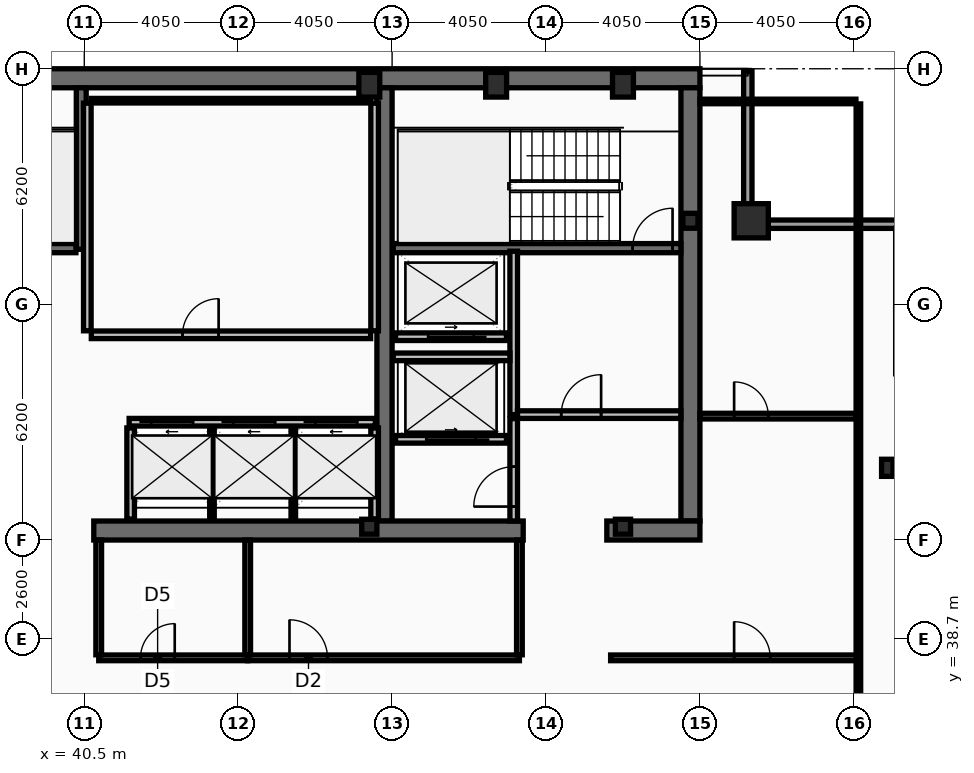
"""IFC4 building model, lengths in metres.
Left out: names, types, materials, properties, quantities, classifications, styles, units other than length and angle.
Written with IfcOpenShell. Run it as: python <this file> out.ifc"""

import sys

from ifc_helpers import new_model, si_unit, direction, frame, frame_2d, origin, origin_2d, place, context, subcontext, project, spatial, rectangle, hollow_rectangle, i_section, extrude, element, fill, save


model = new_model("IFC4")
c1 = context("Model", 3, precision=1e-05, world=origin(), true_north=direction((0.0, 1.0)))
c2 = subcontext(c1, "Body", "Model", "MODEL_VIEW")
j1 = project(units=[si_unit("LENGTHUNIT", "METRE"), si_unit("PLANEANGLEUNIT", "RADIAN")], contexts=[c1])
p1 = place(None, origin())
s1 = spatial("IfcSite", under=j1, at=p1, CompositionType="ELEMENT")
p2 = place(p1, origin())
s2 = spatial("IfcBuilding", under=s1, at=p2, CompositionType="ELEMENT")
p3 = place(p2, frame((0.0, 0.0, 336.2)))
s3 = spatial("IfcBuildingStorey", under=s2, at=p3, CompositionType="ELEMENT", Elevation=336.2)
p4 = place(p3, frame((16.2, 53.45, 0.0), z_axis=(0.0, 0.0, 1.0), x_axis=(1.0, 0.0, 0.0)))
e1 = element("IfcWall", 1, at=p4, inside=s3, PredefinedType="SHEAR", context=c2, shape_type="SweptSolid", body=[
    extrude(rectangle(XDim=40.5, YDim=0.5, at=frame_2d((20.25, 0.0))), origin(), (0.0, 0.0, 1.0), 3.44),
])
p5 = place(p3, frame((56.45, 53.2, 0.0), z_axis=(0.0, 0.0, 1.0), x_axis=(0.0, -1.0, 0.0)))
e2 = element("IfcWall", 2, at=p5, inside=s3, PredefinedType="SHEAR", context=c2, shape_type="SweptSolid", body=[
    extrude(rectangle(XDim=11.4, YDim=0.5, at=frame_2d((5.7, 0.0))), origin(), (0.0, 0.0, 1.0), 3.44),
])
p6 = place(p3, frame((48.4, 41.8, 0.0), z_axis=(0.0, 0.0, 1.0), x_axis=(0.0, 1.0, 0.0)))
e3 = element("IfcWall", 3, at=p6, inside=s3, PredefinedType="SHEAR", context=c2, shape_type="SweptSolid", body=[
    extrude(rectangle(XDim=11.4, YDim=0.4, at=frame_2d((5.7, 0.0))), origin(), (0.0, 0.0, 1.0), 3.44),
])
p7 = place(p3, frame((52.05, 41.55, 0.0), z_axis=(0.0, 0.0, 1.0), x_axis=(-1.0, 0.0, 0.0)))
e4 = element("IfcWall", 4, at=p7, inside=s3, PredefinedType="SHEAR", context=c2, shape_type="SweptSolid", body=[
    extrude(rectangle(XDim=11.3, YDim=0.5, at=frame_2d((5.65, 0.0))), origin(), (0.0, 0.0, 1.0), 3.44),
])
p8 = place(p3, frame((56.7, 41.55, 0.0), z_axis=(0.0, 0.0, 1.0), x_axis=(-1.0, 0.0, 0.0)))
e5 = element("IfcWall", 5, at=p8, inside=s3, PredefinedType="SHEAR", context=c2, shape_type="SweptSolid", body=[
    extrude(rectangle(XDim=2.45, YDim=0.5, at=frame_2d((1.225, 0.0))), origin(), (0.0, 0.0, 1.0), 3.44),
])
p9 = place(p3, frame((40.42, 48.95, 0.0), z_axis=(0.0, 0.0, 1.0), x_axis=(0.0, 1.0, 0.0)))
e6 = element("IfcWall", 6, at=p9, inside=s3, PredefinedType="SHEAR", context=c2, shape_type="SweptSolid", body=[
    extrude(rectangle(XDim=4.25, YDim=0.26, at=frame_2d((2.125, 0.0))), origin(), (0.0, 0.0, 1.0), 3.44),
])
p10 = place(p3, frame((48.63, 48.98, 0.0), z_axis=(0.0, 0.0, 1.0), x_axis=(1.0, 0.0, 0.0)))
e7 = element("IfcWall", 7, at=p10, inside=s3, PredefinedType="SHEAR", context=c2, shape_type="SweptSolid", body=[
    extrude(rectangle(XDim=7.57, YDim=0.24, at=frame_2d((3.785, 0.0))), origin(), (0.0, 0.0, 1.0), 3.44),
])
p11 = place(p10, frame((6.3, 0.0, 0.0)))
e8 = element("IfcOpeningElement", 8, at=p11, cuts=e7, PredefinedType="OPENING", context=c2, shape_type="SweptSolid", body=[
    extrude(rectangle(XDim=1.05, YDim=2.15, at=frame_2d((0.525, 1.075))), frame((0.0, 0.13, 0.0), z_axis=(0.0, -1.0, 0.0), x_axis=(1.0, 0.0, 0.0)), (0.0, 0.0, 1.0), 0.26),
])
p12 = place(p3, frame((32.72, 48.98, 0.0), z_axis=(0.0, 0.0, 1.0), x_axis=(1.0, 0.0, 0.0)))
e9 = element("IfcWall", 9, at=p12, inside=s3, PredefinedType="SHEAR", context=c2, shape_type="SweptSolid", body=[
    extrude(rectangle(XDim=7.56, YDim=0.24, at=frame_2d((3.78, 0.0))), origin(), (0.0, 0.0, 1.0), 3.44),
])
p13 = place(p12, frame((0.22, 0.0, 0.0)))
e10 = element("IfcOpeningElement", 10, at=p13, cuts=e9, PredefinedType="OPENING", context=c2, shape_type="SweptSolid", body=[
    extrude(rectangle(XDim=1.05, YDim=2.15, at=frame_2d((0.525, 1.075))), frame((0.0, 0.13, 0.0), z_axis=(0.0, -1.0, 0.0), x_axis=(1.0, 0.0, 0.0)), (0.0, 0.0, 1.0), 0.26),
])
p14 = place(p3, frame((58.05, 49.7, 0.0), z_axis=(0.0, 0.0, 1.0), x_axis=(1.0, 0.0, 0.0)))
e11 = element("IfcColumn", 11, at=p14, inside=s3, PredefinedType="COLUMN", context=c2, shape_type="SweptSolid", body=[
    extrude(hollow_rectangle(XDim=0.9, YDim=0.9, WallThickness=0.05, at=origin_2d()), origin(), (0.0, 0.0, 1.0), 3.6),
])
for number, where, z_axis, x_axis in (
    (12, (48.0, 53.28, 0.0), (0.0, 0.0, 1.0), (1.0, 0.0, 0.0)),
    (13, (51.337, 53.28, 0.0), (0.0, 0.0, 1.0), (1.0, 0.0, 0.0)),
    (14, (54.675, 53.28, 0.0), (0.0, 0.0, 1.0), (1.0, 0.0, 0.0)),
):
    element("IfcColumn", number, at=place(p3, frame(where, z_axis=z_axis, x_axis=x_axis)), inside=s3, PredefinedType="COLUMN", context=c2, shape_type="SweptSolid", body=[
        extrude(hollow_rectangle(XDim=0.55, YDim=0.65, WallThickness=0.04, at=origin_2d()), origin(), (0.0, 0.0, 1.0), 3.6),
    ])
p15 = place(p3, frame((61.63, 43.2, 0.0), z_axis=(0.0, 0.0, 1.0), x_axis=(1.0, 0.0, 0.0)))
e15 = element("IfcColumn", 15, at=p15, inside=s3, PredefinedType="COLUMN", context=c2, shape_type="SweptSolid", body=[
    extrude(i_section(OverallWidth=0.3, OverallDepth=0.45, WebThickness=0.014, FlangeThickness=0.026, at=origin_2d()), origin(), (0.0, 0.0, 1.0), 3.6),
])
for number, where, z_axis, x_axis in (
    (16, (56.45, 49.7, 0.0), (0.0, 0.0, 1.0), (1.0, 0.0, 0.0)),
    (17, (48.0, 41.65, 0.0), (0.0, 0.0, 1.0), (1.0, 0.0, 0.0)),
    (18, (54.675, 41.65, 0.0), (0.0, 0.0, 1.0), (1.0, 0.0, 0.0)),
):
    element("IfcColumn", number, at=place(p3, frame(where, z_axis=z_axis, x_axis=x_axis)), inside=s3, PredefinedType="COLUMN", context=c2, shape_type="SweptSolid", body=[
        extrude(i_section(OverallWidth=0.399, OverallDepth=0.393, WebThickness=0.023, FlangeThickness=0.037, at=origin_2d()), origin(), (0.0, 0.0, 1.0), 3.6),
    ])
p16 = place(p3, frame((57.96, 53.63, 0.0), z_axis=(0.0, 0.0, 1.0), x_axis=(0.0, -1.0, 0.0)))
e19 = element("IfcWall", 19, at=p16, inside=s3, PredefinedType="SOLIDWALL", context=c2, shape_type="SweptSolid", body=[
    extrude(rectangle(XDim=3.91, YDim=0.22, at=frame_2d((1.955, 0.0))), origin(), (0.0, 0.0, 1.0), 2.88),
])
p17 = place(p3, frame((57.85, 49.61, 0.0), z_axis=(0.0, 0.0, 1.0), x_axis=(1.0, 0.0, 0.0)))
e20 = element("IfcWall", 20, at=p17, inside=s3, PredefinedType="SOLIDWALL", context=c2, shape_type="SweptSolid", body=[
    extrude(rectangle(XDim=4.22, YDim=0.22, at=frame_2d((2.11, 0.0))), origin(), (0.0, 0.0, 1.0), 2.88),
])
p18 = place(p3, frame((41.68, 44.4, 0.0), z_axis=(0.0, 0.0, 1.0), x_axis=(1.0, 0.0, 0.0)))
e21 = element("IfcWall", 21, at=p18, inside=s3, PredefinedType="PARTITIONING", context=c2, shape_type="SweptSolid", body=[
    extrude(rectangle(XDim=6.48, YDim=0.2, at=frame_2d((3.24, 0.0))), origin(), (0.0, 0.0, 1.0), 3.44),
])
p19 = place(p18, frame((0.58, 0.0, 0.0)))
e22 = element("IfcOpeningElement", 22, at=p19, cuts=e21, PredefinedType="OPENING", context=c2, shape_type="SweptSolid", body=[
    extrude(rectangle(XDim=1.1, YDim=2.18, at=frame_2d((0.55, 1.09))), frame((0.0, 0.11, 0.0), z_axis=(0.0, -1.0, 0.0), x_axis=(1.0, 0.0, 0.0)), (0.0, 0.0, 1.0), 0.22),
])
p20 = place(p18, frame((2.74, 0.0, 0.0)))
e23 = element("IfcOpeningElement", 23, at=p20, cuts=e21, PredefinedType="OPENING", context=c2, shape_type="SweptSolid", body=[
    extrude(rectangle(XDim=1.1, YDim=2.18, at=frame_2d((0.55, 1.09))), frame((0.0, 0.11, 0.0), z_axis=(0.0, -1.0, 0.0), x_axis=(1.0, 0.0, 0.0)), (0.0, 0.0, 1.0), 0.22),
])
p21 = place(p18, frame((4.9, 0.0, 0.0)))
e24 = element("IfcOpeningElement", 24, at=p21, cuts=e21, PredefinedType="OPENING", context=c2, shape_type="SweptSolid", body=[
    extrude(rectangle(XDim=1.1, YDim=2.18, at=frame_2d((0.55, 1.09))), frame((0.0, 0.11, 0.0), z_axis=(0.0, -1.0, 0.0), x_axis=(1.0, 0.0, 0.0)), (0.0, 0.0, 1.0), 0.22),
])
p22 = place(p3, frame((51.61, 43.95, 0.0), z_axis=(0.0, 0.0, 1.0), x_axis=(-1.0, 0.0, 0.0)))
e25 = element("IfcWall", 25, at=p22, inside=s3, PredefinedType="PARTITIONING", context=c2, shape_type="SweptSolid", body=[
    extrude(rectangle(XDim=2.92, YDim=0.2, at=frame_2d((1.46, 0.0))), origin(), (0.0, 0.0, 1.0), 3.44),
])
p23 = place(p22, frame((0.81, 0.0, 0.0)))
e26 = element("IfcOpeningElement", 26, at=p23, cuts=e25, PredefinedType="OPENING", context=c2, shape_type="SweptSolid", body=[
    extrude(rectangle(XDim=1.3, YDim=2.18, at=frame_2d((0.65, 1.09))), frame((0.0, 0.11, 0.0), z_axis=(0.0, -1.0, 0.0), x_axis=(1.0, 0.0, 0.0)), (0.0, 0.0, 1.0), 0.22),
])
p24 = place(p3, frame((51.61, 46.65, 0.0), z_axis=(0.0, 0.0, 1.0), x_axis=(-1.0, 0.0, 0.0)))
e27 = element("IfcWall", 27, at=p24, inside=s3, PredefinedType="PARTITIONING", context=c2, shape_type="SweptSolid", body=[
    extrude(rectangle(XDim=2.92, YDim=0.2, at=frame_2d((1.46, 0.0))), origin(), (0.0, 0.0, 1.0), 3.44),
])
p25 = place(p24, frame((0.86, 0.0, 0.0)))
e28 = element("IfcOpeningElement", 28, at=p25, cuts=e27, PredefinedType="OPENING", context=c2, shape_type="SweptSolid", body=[
    extrude(rectangle(XDim=1.2, YDim=2.18, at=frame_2d((0.6, 1.09))), frame((0.0, 0.11, 0.0), z_axis=(0.0, -1.0, 0.0), x_axis=(1.0, 0.0, 0.0)), (0.0, 0.0, 1.0), 0.22),
])
p26 = place(p3, frame((51.8, 44.6, 0.0), z_axis=(0.0, 0.0, 1.0), x_axis=(0.0, 1.0, 0.0)))
e29 = element("IfcWall", 29, at=p26, inside=s3, PredefinedType="PARTITIONING", context=c2, shape_type="SweptSolid", body=[
    extrude(rectangle(XDim=4.3, YDim=0.2, at=frame_2d((2.15, 0.0))), origin(), (0.0, 0.0, 1.0), 3.44),
])
p27 = place(p3, frame((51.9, 44.6, 0.0), z_axis=(0.0, 0.0, 1.0), x_axis=(1.0, 0.0, 0.0)))
e30 = element("IfcWall", 30, at=p27, inside=s3, PredefinedType="PARTITIONING", context=c2, shape_type="SweptSolid", body=[
    extrude(rectangle(XDim=4.3, YDim=0.2, at=frame_2d((2.15, 0.0))), origin(), (0.0, 0.0, 1.0), 3.44),
])
p28 = place(p27, frame((1.15, 0.0, 0.0)))
e31 = element("IfcOpeningElement", 31, at=p28, cuts=e30, PredefinedType="OPENING", context=c2, shape_type="SweptSolid", body=[
    extrude(rectangle(XDim=1.05, YDim=2.15, at=frame_2d((0.525, 1.075))), frame((0.0, 0.11, 0.0), z_axis=(0.0, -1.0, 0.0), x_axis=(1.0, 0.0, 0.0)), (0.0, 0.0, 1.0), 0.22),
])
p29 = place(p3, frame((48.63, 46.12, 0.0), z_axis=(0.0, 0.0, 1.0), x_axis=(1.0, 0.0, 0.0)))
e32 = element("IfcWall", 32, at=p29, inside=s3, PredefinedType="PARTITIONING", context=c2, shape_type="SweptSolid", body=[
    extrude(rectangle(XDim=3.07, YDim=0.2, at=frame_2d((1.535, 0.0))), origin(), (0.0, 0.0, 1.0), 3.44),
])
p30 = place(p3, frame((51.8, 41.8, 0.0), z_axis=(0.0, 0.0, 1.0), x_axis=(0.0, 1.0, 0.0)))
e33 = element("IfcWall", 33, at=p30, inside=s3, PredefinedType="PARTITIONING", context=c2, shape_type="SweptSolid", body=[
    extrude(rectangle(XDim=2.695, YDim=0.2, at=frame_2d((1.348, 0.0))), origin(), (0.0, 0.0, 1.0), 3.44),
])
p31 = place(p30, frame((0.38, 0.0, 0.0)))
e34 = element("IfcOpeningElement", 34, at=p31, cuts=e33, PredefinedType="OPENING", context=c2, shape_type="SweptSolid", body=[
    extrude(rectangle(XDim=1.05, YDim=2.15, at=frame_2d((0.525, 1.075))), frame((0.0, 0.11, 0.0), z_axis=(0.0, -1.0, 0.0), x_axis=(1.0, 0.0, 0.0)), (0.0, 0.0, 1.0), 0.22),
])
for number, where, z_axis, x_axis in (
    (35, (40.58, 46.805, 0.0), (0.0, 0.0, 1.0), (0.0, 1.0, 0.0)),
    (36, (48.14, 46.805, 0.0), (0.0, 0.0, 1.0), (0.0, 1.0, 0.0)),
):
    element("IfcWall", number, at=place(p3, frame(where, z_axis=z_axis, x_axis=x_axis)), inside=s3, PredefinedType="PARTITIONING", context=c2, shape_type="SweptSolid", body=[
        extrude(rectangle(XDim=5.99, YDim=0.2, at=frame_2d((2.995, 0.0))), origin(), (0.0, 0.0, 1.0), 3.44),
    ])
p32 = place(p3, frame((40.685, 52.86, 0.0), z_axis=(0.0, 0.0, 1.0), x_axis=(1.0, 0.0, 0.0)))
e37 = element("IfcWall", 37, at=p32, inside=s3, PredefinedType="PARTITIONING", context=c2, shape_type="SweptSolid", body=[
    extrude(rectangle(XDim=7.35, YDim=0.12, at=frame_2d((3.675, 0.0))), origin(), (0.0, 0.0, 1.0), 3.44),
])
p33 = place(p3, frame((40.685, 46.7, 0.0), z_axis=(0.0, 0.0, 1.0), x_axis=(1.0, 0.0, 0.0)))
e38 = element("IfcWall", 38, at=p33, inside=s3, PredefinedType="PARTITIONING", context=c2, shape_type="SweptSolid", body=[
    extrude(rectangle(XDim=7.35, YDim=0.2, at=frame_2d((3.675, 0.0))), origin(), (0.0, 0.0, 1.0), 3.44),
])
p34 = place(p33, frame((2.4, 0.0, 0.0)))
e39 = element("IfcOpeningElement", 39, at=p34, cuts=e38, PredefinedType="OPENING", context=c2, shape_type="SweptSolid", body=[
    extrude(rectangle(XDim=0.95, YDim=2.1, at=frame_2d((0.475, 1.05))), frame((0.0, 0.11, 0.0), z_axis=(0.0, -1.0, 0.0), x_axis=(1.0, 0.0, 0.0)), (0.0, 0.0, 1.0), 0.22),
])
for number, where, z_axis, x_axis in (
    (40, (41.72, 41.85, 0.0), (0.0, 0.0, 1.0), (0.0, 1.0, 0.0)),
    (41, (48.14, 41.85, 0.0), (0.0, 0.0, 1.0), (0.0, 1.0, 0.0)),
):
    element("IfcWall", number, at=place(p3, frame(where, z_axis=z_axis, x_axis=x_axis)), inside=s3, PredefinedType="PARTITIONING", context=c2, shape_type="SweptSolid", body=[
        extrude(rectangle(XDim=2.4, YDim=0.2, at=frame_2d((1.2, 0.0))), origin(), (0.0, 0.0, 1.0), 3.44),
    ])
for number, where, z_axis, x_axis in (
    (42, (43.86, 41.85, 0.0), (0.0, 0.0, 1.0), (0.0, 1.0, 0.0)),
    (43, (46.0, 41.85, 0.0), (0.0, 0.0, 1.0), (0.0, 1.0, 0.0)),
):
    element("IfcWall", number, at=place(p3, frame(where, z_axis=z_axis, x_axis=x_axis)), inside=s3, PredefinedType="PARTITIONING", context=c2, shape_type="SweptSolid", body=[
        extrude(rectangle(XDim=2.4, YDim=0.12, at=frame_2d((1.2, 0.0))), origin(), (0.0, 0.0, 1.0), 3.44),
    ])
p35 = place(p3, frame((40.88, 38.2, 0.0), z_axis=(0.0, 0.0, 1.0), x_axis=(1.0, 0.0, 0.0)))
e44 = element("IfcWall", 44, at=p35, inside=s3, PredefinedType="PARTITIONING", context=c2, shape_type="SweptSolid", body=[
    extrude(rectangle(XDim=3.92, YDim=0.15, at=frame_2d((1.96, 0.0))), origin(), (0.0, 0.0, 1.0), 3.44),
])
p36 = place(p35, frame((1.1, 0.0, 0.0)))
e45 = element("IfcOpeningElement", 45, at=p36, cuts=e44, PredefinedType="OPENING", context=c2, shape_type="SweptSolid", body=[
    extrude(rectangle(XDim=0.9, YDim=2.05, at=frame_2d((0.45, 1.025))), frame((0.0, 0.085, 0.0), z_axis=(0.0, -1.0, 0.0), x_axis=(1.0, 0.0, 0.0)), (0.0, 0.0, 1.0), 0.17),
])
p37 = place(p3, frame((44.8, 38.2, 0.0), z_axis=(0.0, 0.0, 1.0), x_axis=(1.0, 0.0, 0.0)))
e46 = element("IfcWall", 46, at=p37, inside=s3, PredefinedType="PARTITIONING", context=c2, shape_type="SweptSolid", body=[
    extrude(rectangle(XDim=7.15, YDim=0.15, at=frame_2d((3.575, 0.0))), origin(), (0.0, 0.0, 1.0), 2.83),
])
p38 = place(p37, frame((1.1, 0.0, 0.0)))
e47 = element("IfcOpeningElement", 47, at=p38, cuts=e46, PredefinedType="OPENING", context=c2, shape_type="SweptSolid", body=[
    extrude(rectangle(XDim=1.0, YDim=2.05, at=frame_2d((0.5, 1.025))), frame((0.0, 0.085, 0.0), z_axis=(0.0, -1.0, 0.0), x_axis=(1.0, 0.0, 0.0)), (0.0, 0.0, 1.0), 0.17),
])
for number, where, z_axis, x_axis in (
    (48, (40.88, 38.28, 0.0), (0.0, 0.0, 1.0), (0.0, 1.0, 0.0)),
    (49, (44.8, 38.28, 0.0), (0.0, 0.0, 1.0), (0.0, 1.0, 0.0)),
    (50, (51.95, 38.28, 0.0), (0.0, 0.0, 1.0), (0.0, 1.0, 0.0)),
):
    element("IfcWall", number, at=place(p3, frame(where, z_axis=z_axis, x_axis=x_axis)), inside=s3, PredefinedType="PARTITIONING", context=c2, shape_type="SweptSolid", body=[
        extrude(rectangle(XDim=3.02, YDim=0.15, at=frame_2d((1.51, 0.0))), origin(), (0.0, 0.0, 1.0), 3.44),
    ])
p39 = place(p3, frame((54.35, 38.2, 0.0), z_axis=(0.0, 0.0, 1.0), x_axis=(1.0, 0.0, 0.0)))
e51 = element("IfcWall", 51, at=p39, inside=s3, PredefinedType="PARTITIONING", context=c2, shape_type="SweptSolid", body=[
    extrude(rectangle(XDim=6.52, YDim=0.15, at=frame_2d((3.26, 0.0))), origin(), (0.0, 0.0, 1.0), 2.83),
])
p40 = place(p39, frame((3.25, 0.0, 0.0)))
e52 = element("IfcOpeningElement", 52, at=p40, cuts=e51, PredefinedType="OPENING", context=c2, shape_type="SweptSolid", body=[
    extrude(rectangle(XDim=0.95, YDim=2.05, at=frame_2d((0.475, 1.025))), frame((0.0, 0.085, 0.0), z_axis=(0.0, -1.0, 0.0), x_axis=(1.0, 0.0, 0.0)), (0.0, 0.0, 1.0), 0.17),
])
p41 = place(p3, frame((56.7, 44.56, 0.0), z_axis=(0.0, 0.0, 1.0), x_axis=(1.0, 0.0, 0.0)))
e53 = element("IfcWall", 53, at=p41, inside=s3, PredefinedType="PARTITIONING", context=c2, shape_type="SweptSolid", body=[
    extrude(rectangle(XDim=4.105, YDim=0.15, at=frame_2d((2.052, 0.0))), origin(), (0.0, 0.0, 1.0), 2.88),
])
p42 = place(p41, frame((0.9, 0.0, 0.0)))
e54 = element("IfcOpeningElement", 54, at=p42, cuts=e53, PredefinedType="OPENING", context=c2, shape_type="SweptSolid", body=[
    extrude(rectangle(XDim=0.9, YDim=2.05, at=frame_2d((0.45, 1.025))), frame((0.0, 0.085, 0.0), z_axis=(0.0, -1.0, 0.0), x_axis=(1.0, 0.0, 0.0)), (0.0, 0.0, 1.0), 0.17),
])
p43 = place(p3, frame((60.87, 10.665, 0.0), z_axis=(0.0, 0.0, 1.0), x_axis=(0.0, 1.0, 0.0)))
e55 = element("IfcWall", 55, at=p43, inside=s3, PredefinedType="PARTITIONING", context=c2, shape_type="SweptSolid", body=[
    extrude(rectangle(XDim=42.11, YDim=0.12, at=frame_2d((21.055, 0.0))), origin(), (0.0, 0.0, 1.0), 2.83),
])
p44 = place(p3, frame((56.7, 52.84, 0.0), z_axis=(0.0, 0.0, 1.0), x_axis=(1.0, 0.0, 0.0)))
e56 = element("IfcWall", 56, at=p44, inside=s3, PredefinedType="PARTITIONING", context=c2, shape_type="SweptSolid", body=[
    extrude(rectangle(XDim=4.105, YDim=0.12, at=frame_2d((2.052, 0.0))), origin(), (0.0, 0.0, 1.0), 3.44),
])
p45 = place(p11, origin())
e57 = element("IfcDoor", 57, at=p45, inside=s3, OperationType="SINGLE_SWING_RIGHT", PredefinedType="DOOR", context=c2, shape_type="SweptSolid", body=[
    extrude(rectangle(XDim=1.05, YDim=2.15, at=frame_2d((0.525, 1.075))), frame((0.0, 0.025, 0.0), z_axis=(0.0, -1.0, 0.0), x_axis=(1.0, 0.0, 0.0)), (0.0, 0.0, 1.0), 0.05),
])
fill(e8, e57)
p46 = place(p19, origin())
e58 = element("IfcDoor", 58, at=p46, inside=s3, OperationType="SLIDING_TO_LEFT", PredefinedType="DOOR", context=c2, shape_type="SweptSolid", body=[
    extrude(rectangle(XDim=1.1, YDim=2.18, at=frame_2d((0.55, 1.09))), frame((0.0, 0.025, 0.0), z_axis=(0.0, -1.0, 0.0), x_axis=(1.0, 0.0, 0.0)), (0.0, 0.0, 1.0), 0.05),
])
fill(e22, e58)
p47 = place(p20, origin())
e59 = element("IfcDoor", 59, at=p47, inside=s3, OperationType="SLIDING_TO_LEFT", PredefinedType="DOOR", context=c2, shape_type="SweptSolid", body=[
    extrude(rectangle(XDim=1.1, YDim=2.18, at=frame_2d((0.55, 1.09))), frame((0.0, 0.025, 0.0), z_axis=(0.0, -1.0, 0.0), x_axis=(1.0, 0.0, 0.0)), (0.0, 0.0, 1.0), 0.05),
])
fill(e23, e59)
p48 = place(p21, origin())
e60 = element("IfcDoor", 60, at=p48, inside=s3, OperationType="SLIDING_TO_LEFT", PredefinedType="DOOR", context=c2, shape_type="SweptSolid", body=[
    extrude(rectangle(XDim=1.1, YDim=2.18, at=frame_2d((0.55, 1.09))), frame((0.0, 0.025, 0.0), z_axis=(0.0, -1.0, 0.0), x_axis=(1.0, 0.0, 0.0)), (0.0, 0.0, 1.0), 0.05),
])
fill(e24, e60)
p49 = place(p23, origin())
e61 = element("IfcDoor", 61, at=p49, inside=s3, OperationType="SLIDING_TO_LEFT", PredefinedType="DOOR", context=c2, shape_type="SweptSolid", body=[
    extrude(rectangle(XDim=1.3, YDim=2.18, at=frame_2d((0.65, 1.09))), frame((0.0, 0.025, 0.0), z_axis=(0.0, -1.0, 0.0), x_axis=(1.0, 0.0, 0.0)), (0.0, 0.0, 1.0), 0.05),
])
fill(e26, e61)
p50 = place(p25, origin())
e62 = element("IfcDoor", 62, at=p50, inside=s3, OperationType="SLIDING_TO_LEFT", PredefinedType="DOOR", context=c2, shape_type="SweptSolid", body=[
    extrude(rectangle(XDim=1.2, YDim=2.18, at=frame_2d((0.6, 1.09))), frame((0.0, 0.025, 0.0), z_axis=(0.0, -1.0, 0.0), x_axis=(1.0, 0.0, 0.0)), (0.0, 0.0, 1.0), 0.05),
])
fill(e28, e62)
p51 = place(p28, origin())
e63 = element("IfcDoor", 63, at=p51, inside=s3, OperationType="SINGLE_SWING_RIGHT", PredefinedType="DOOR", context=c2, shape_type="SweptSolid", body=[
    extrude(rectangle(XDim=1.05, YDim=2.15, at=frame_2d((0.525, 1.075))), frame((0.0, 0.025, 0.0), z_axis=(0.0, -1.0, 0.0), x_axis=(1.0, 0.0, 0.0)), (0.0, 0.0, 1.0), 0.05),
])
fill(e31, e63)
p52 = place(p31, origin())
e64 = element("IfcDoor", 64, at=p52, inside=s3, OperationType="SINGLE_SWING_LEFT", PredefinedType="DOOR", context=c2, shape_type="SweptSolid", body=[
    extrude(rectangle(XDim=1.05, YDim=2.15, at=frame_2d((0.525, 1.075))), frame((0.0, 0.025, 0.0), z_axis=(0.0, -1.0, 0.0), x_axis=(1.0, 0.0, 0.0)), (0.0, 0.0, 1.0), 0.05),
])
fill(e34, e64)
p53 = place(p34, origin())
e65 = element("IfcDoor", 65, at=p53, inside=s3, OperationType="SINGLE_SWING_RIGHT", PredefinedType="DOOR", context=c2, shape_type="SweptSolid", body=[
    extrude(rectangle(XDim=0.95, YDim=2.1, at=frame_2d((0.475, 1.05))), frame((0.0, 0.025, 0.0), z_axis=(0.0, -1.0, 0.0), x_axis=(1.0, 0.0, 0.0)), (0.0, 0.0, 1.0), 0.05),
])
fill(e39, e65)
p54 = place(p36, origin())
e66 = element("IfcDoor", 66, at=p54, inside=s3, OperationType="SINGLE_SWING_RIGHT", PredefinedType="DOOR", context=c2, shape_type="SweptSolid", body=[
    extrude(rectangle(XDim=0.9, YDim=2.05, at=frame_2d((0.45, 1.025))), frame((0.0, 0.025, 0.0), z_axis=(0.0, -1.0, 0.0), x_axis=(1.0, 0.0, 0.0)), (0.0, 0.0, 1.0), 0.05),
])
fill(e45, e66)
p55 = place(p38, origin())
e67 = element("IfcDoor", 67, at=p55, inside=s3, OperationType="SINGLE_SWING_LEFT", PredefinedType="DOOR", context=c2, shape_type="SweptSolid", body=[
    extrude(rectangle(XDim=1.0, YDim=2.05, at=frame_2d((0.5, 1.025))), frame((0.0, 0.025, 0.0), z_axis=(0.0, -1.0, 0.0), x_axis=(1.0, 0.0, 0.0)), (0.0, 0.0, 1.0), 0.05),
])
fill(e47, e67)
p56 = place(p40, origin())
e68 = element("IfcDoor", 68, at=p56, inside=s3, OperationType="SINGLE_SWING_LEFT", PredefinedType="DOOR", context=c2, shape_type="SweptSolid", body=[
    extrude(rectangle(XDim=0.95, YDim=2.05, at=frame_2d((0.475, 1.025))), frame((0.0, 0.025, 0.0), z_axis=(0.0, -1.0, 0.0), x_axis=(1.0, 0.0, 0.0)), (0.0, 0.0, 1.0), 0.05),
])
fill(e52, e68)
p57 = place(p42, origin())
e69 = element("IfcDoor", 69, at=p57, inside=s3, OperationType="SINGLE_SWING_LEFT", PredefinedType="DOOR", context=c2, shape_type="SweptSolid", body=[
    extrude(rectangle(XDim=0.9, YDim=2.05, at=frame_2d((0.45, 1.025))), frame((0.0, 0.025, 0.0), z_axis=(0.0, -1.0, 0.0), x_axis=(1.0, 0.0, 0.0)), (0.0, 0.0, 1.0), 0.05),
])
fill(e54, e69)
save(model, sys.argv[1])
